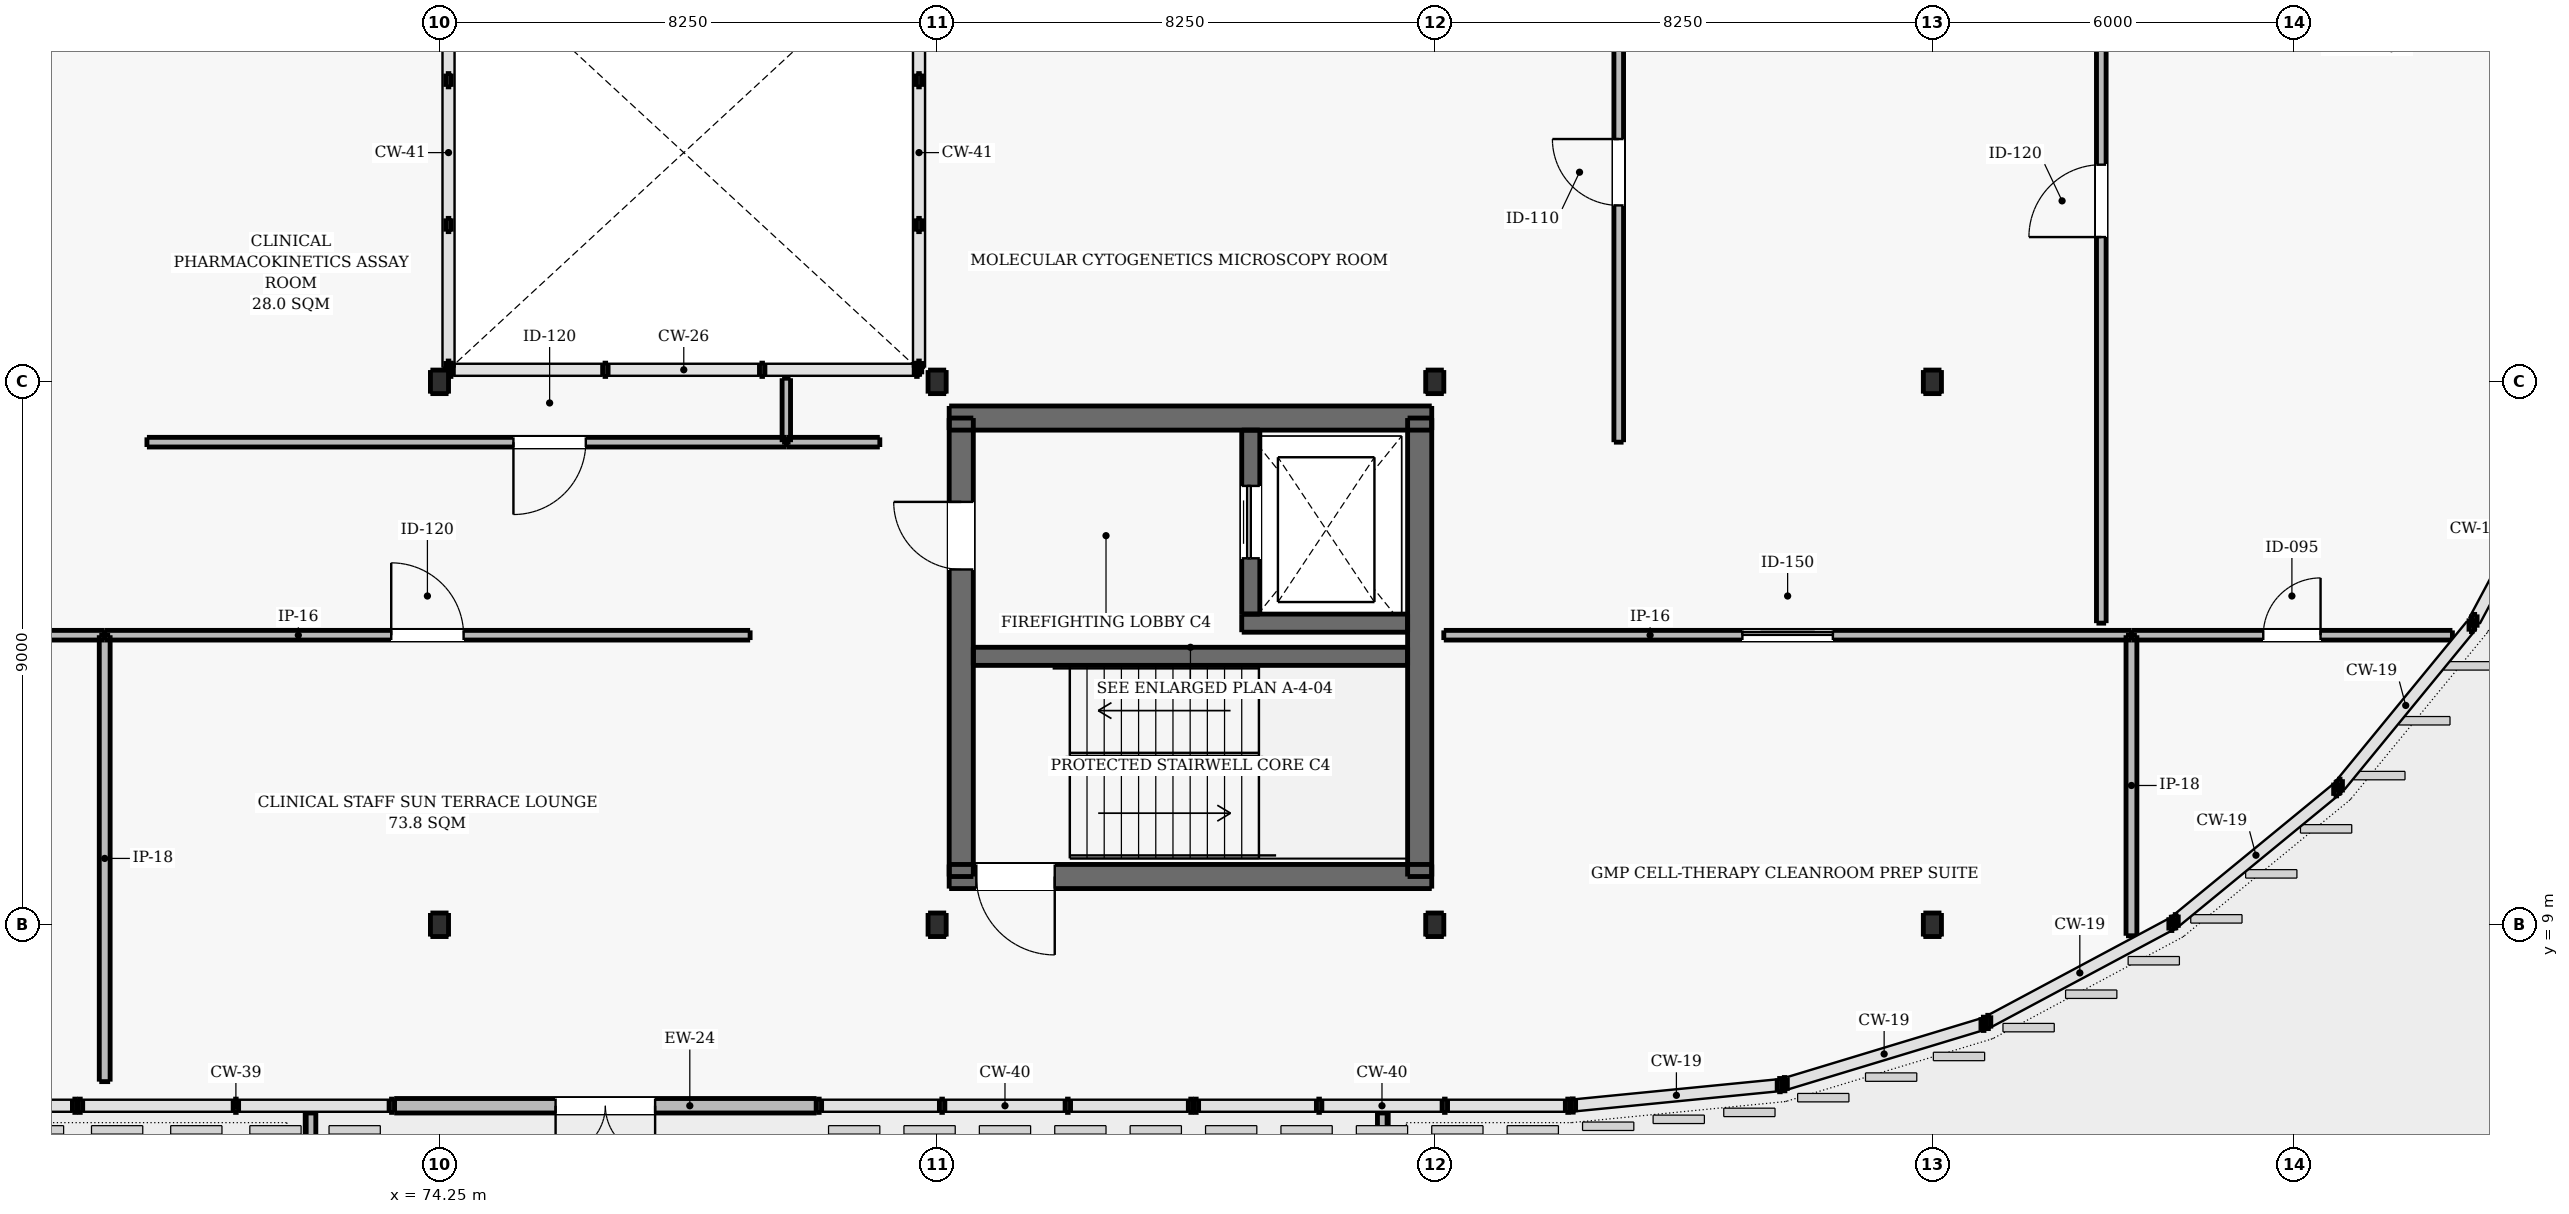
"""IFC4 building model, lengths in metres.
Left out: names, types, materials, properties, quantities, classifications, styles, units other than length and angle.
Written with IfcOpenShell. Run it as: python <this file> out.ifc"""

import sys

from ifc_helpers import new_model, si_unit, direction, frame, frame_2d, origin, origin_2d, place, context, subcontext, project, spatial, rectangle, i_section, extrude, element, fill, save


model = new_model("IFC4")
c1 = context("Model", 3, precision=1e-05, world=origin(), true_north=direction((0.0, 1.0)))
c2 = subcontext(c1, "Body", "Model", "MODEL_VIEW")
j1 = project(units=[si_unit("LENGTHUNIT", "METRE"), si_unit("PLANEANGLEUNIT", "RADIAN")], contexts=[c1])
p1 = place(None, origin())
s1 = spatial("IfcSite", under=j1, at=p1, CompositionType="ELEMENT")
p2 = place(p1, origin())
s2 = spatial("IfcBuilding", under=s1, at=p2, CompositionType="ELEMENT")
p3 = place(p2, frame((0.0, 0.0, 22.2)))
s3 = spatial("IfcBuildingStorey", under=s2, at=p3, CompositionType="ELEMENT", Elevation=22.2)
for number, where, z_axis, x_axis in (
    (1, (74.25, 9.0, 0.0), (0.0, 0.0, 1.0), (1.0, 0.0, 0.0)),
    (2, (74.25, 18.0, 0.0), (0.0, 0.0, 1.0), (1.0, 0.0, 0.0)),
    (3, (82.5, 9.0, 0.0), (0.0, 0.0, 1.0), (1.0, 0.0, 0.0)),
    (4, (82.5, 18.0, 0.0), (0.0, 0.0, 1.0), (1.0, 0.0, 0.0)),
    (5, (90.75, 9.0, 0.0), (0.0, 0.0, 1.0), (1.0, 0.0, 0.0)),
    (6, (90.75, 18.0, 0.0), (0.0, 0.0, 1.0), (1.0, 0.0, 0.0)),
    (7, (99.0, 9.0, 0.0), (0.0, 0.0, 1.0), (1.0, 0.0, 0.0)),
    (8, (99.0, 18.0, 0.0), (0.0, 0.0, 1.0), (1.0, 0.0, 0.0)),
):
    element("IfcColumn", number, at=place(p3, frame(where, z_axis=z_axis, x_axis=x_axis)), inside=s3, PredefinedType="COLUMN", context=c2, shape_type="SweptSolid", body=[
        extrude(i_section(OverallWidth=0.3, OverallDepth=0.39, WebThickness=0.011, FlangeThickness=0.019, FilletRadius=0.027, at=origin_2d()), origin(), (0.0, 0.0, 1.0), 4.2),
    ])
p4 = place(p3, frame((82.7, 9.8, 0.0), z_axis=(0.0, 0.0, 1.0), x_axis=(1.0, 0.0, 0.0)))
e9 = element("IfcWall", 9, at=p4, inside=s3, PredefinedType="SHEAR", context=c2, shape_type="SweptSolid", body=[
    extrude(rectangle(XDim=8.0, YDim=0.4, at=frame_2d((4.0, 0.0))), origin(), (0.0, 0.0, 1.0), 4.2),
])
p5 = place(p4, frame((0.45, 0.0, 0.0)))
e10 = element("IfcOpeningElement", 10, at=p5, cuts=e9, PredefinedType="OPENING", context=c2, shape_type="SweptSolid", body=[
    extrude(rectangle(XDim=1.3, YDim=2.15, at=frame_2d((0.65, 1.075))), frame((0.0, 0.21, 0.0), z_axis=(0.0, -1.0, 0.0), x_axis=(1.0, 0.0, 0.0)), (0.0, 0.0, 1.0), 0.42),
])
p6 = place(p3, frame((82.7, 17.4, 0.0), z_axis=(0.0, 0.0, 1.0), x_axis=(1.0, 0.0, 0.0)))
e11 = element("IfcWall", 11, at=p6, inside=s3, PredefinedType="SHEAR", context=c2, shape_type="SweptSolid", body=[
    extrude(rectangle(XDim=8.0, YDim=0.4, at=frame_2d((4.0, 0.0))), origin(), (0.0, 0.0, 1.0), 4.2),
])
p7 = place(p3, frame((82.9, 9.8, 0.0), z_axis=(0.0, 0.0, 1.0), x_axis=(0.0, 1.0, 0.0)))
e12 = element("IfcWall", 12, at=p7, inside=s3, PredefinedType="SHEAR", context=c2, shape_type="SweptSolid", body=[
    extrude(rectangle(XDim=7.6, YDim=0.4, at=frame_2d((3.8, 0.0))), origin(), (0.0, 0.0, 1.0), 4.2),
])
p8 = place(p7, frame((5.09, 0.0, 0.0)))
e13 = element("IfcOpeningElement", 13, at=p8, cuts=e12, PredefinedType="OPENING", context=c2, shape_type="SweptSolid", body=[
    extrude(rectangle(XDim=1.12, YDim=2.15, at=frame_2d((0.56, 1.075))), frame((0.0, 0.21, 0.0), z_axis=(0.0, -1.0, 0.0), x_axis=(1.0, 0.0, 0.0)), (0.0, 0.0, 1.0), 0.42),
])
p9 = place(p3, frame((90.5, 9.8, 0.0), z_axis=(0.0, 0.0, 1.0), x_axis=(0.0, 1.0, 0.0)))
e14 = element("IfcWall", 14, at=p9, inside=s3, PredefinedType="SHEAR", context=c2, shape_type="SweptSolid", body=[
    extrude(rectangle(XDim=7.6, YDim=0.4, at=frame_2d((3.8, 0.0))), origin(), (0.0, 0.0, 1.0), 4.2),
])
p10 = place(p3, frame((83.1, 13.45, 0.0), z_axis=(0.0, 0.0, 1.0), x_axis=(1.0, 0.0, 0.0)))
e15 = element("IfcWall", 15, at=p10, inside=s3, PredefinedType="SHEAR", context=c2, shape_type="SweptSolid", body=[
    extrude(rectangle(XDim=7.2, YDim=0.3, at=frame_2d((3.6, 0.0))), origin(), (0.0, 0.0, 1.0), 4.2),
])
p11 = place(p3, frame((87.55, 14.0, 0.0), z_axis=(0.0, 0.0, 1.0), x_axis=(1.0, 0.0, 0.0)))
e16 = element("IfcWall", 16, at=p11, inside=s3, PredefinedType="SHEAR", context=c2, shape_type="SweptSolid", body=[
    extrude(rectangle(XDim=2.75, YDim=0.3, at=frame_2d((1.375, 0.0))), origin(), (0.0, 0.0, 1.0), 4.2),
])
p12 = place(p3, frame((87.7, 14.15, 0.0), z_axis=(0.0, 0.0, 1.0), x_axis=(0.0, 1.0, 0.0)))
e17 = element("IfcWall", 17, at=p12, inside=s3, PredefinedType="SHEAR", context=c2, shape_type="SweptSolid", body=[
    extrude(rectangle(XDim=3.05, YDim=0.3, at=frame_2d((1.525, 0.0))), origin(), (0.0, 0.0, 1.0), 4.2),
])
p13 = place(p12, frame((0.925, 0.0, 0.0)))
e18 = element("IfcOpeningElement", 18, at=p13, cuts=e17, PredefinedType="OPENING", context=c2, shape_type="SweptSolid", body=[
    extrude(rectangle(XDim=1.2, YDim=2.15, at=frame_2d((0.6, 1.075))), frame((0.0, 0.16, 0.0), z_axis=(0.0, -1.0, 0.0), x_axis=(1.0, 0.0, 0.0)), (0.0, 0.0, 1.0), 0.32),
])
p14 = place(p3, frame((80.5, 6.0, 0.0), z_axis=(0.0, 0.0, 1.0), x_axis=(-1.0, 0.0, 0.0)))
e19 = element("IfcWall", 19, at=p14, inside=s3, PredefinedType="SOLIDWALL", context=c2, shape_type="SweptSolid", body=[
    extrude(rectangle(XDim=7.0, YDim=0.24, at=frame_2d((3.5, 0.0))), origin(), (0.0, 0.0, 1.0), 3.94),
])
p15 = place(p14, frame((2.675, 0.0, 0.0)))
e20 = element("IfcOpeningElement", 20, at=p15, cuts=e19, PredefinedType="OPENING", context=c2, shape_type="SweptSolid", body=[
    extrude(rectangle(XDim=1.65, YDim=2.2, at=frame_2d((0.825, 1.1))), frame((0.0, 0.13, 0.0), z_axis=(0.0, -1.0, 0.0), x_axis=(1.0, 0.0, 0.0)), (0.0, 0.0, 1.0), 0.26),
])
for number, where, z_axis, x_axis in (
    (21, (72.12, 0.12, 0.0), (0.0, 0.0, 1.0), (0.0, 1.0, 0.0)),
    (22, (89.88, 0.12, 0.0), (0.0, 0.0, 1.0), (0.0, 1.0, 0.0)),
):
    element("IfcWall", number, at=place(p3, frame(where, z_axis=z_axis, x_axis=x_axis)), inside=s3, PredefinedType="PARAPET", context=c2, shape_type="SweptSolid", body=[
        extrude(rectangle(XDim=5.76, YDim=0.16, at=frame_2d((2.88, 0.0))), origin(), (0.0, 0.0, 1.0), 1.14),
    ])
p16 = place(p3, frame((58.0, 13.8, 0.0), z_axis=(0.0, 0.0, 1.0), x_axis=(1.0, 0.0, 0.0)))
e23 = element("IfcWall", 23, at=p16, inside=s3, PredefinedType="PARTITIONING", context=c2, shape_type="SweptSolid", body=[
    extrude(rectangle(XDim=10.7, YDim=0.16, at=frame_2d((5.35, 0.0))), origin(), (0.0, 0.0, 1.0), 3.94),
])
p17 = place(p16, frame((4.75, 0.0, 0.0)))
e24 = element("IfcOpeningElement", 24, at=p17, cuts=e23, PredefinedType="OPENING", context=c2, shape_type="SweptSolid", body=[
    extrude(rectangle(XDim=1.2, YDim=2.2, at=frame_2d((0.6, 1.1))), frame((0.0, 0.09, 0.0), z_axis=(0.0, -1.0, 0.0), x_axis=(1.0, 0.0, 0.0)), (0.0, 0.0, 1.0), 0.18),
])
p18 = place(p3, frame((68.7, 6.4, 0.0), z_axis=(0.0, 0.0, 1.0), x_axis=(0.0, 1.0, 0.0)))
e25 = element("IfcWall", 25, at=p18, inside=s3, PredefinedType="PARTITIONING", context=c2, shape_type="SweptSolid", body=[
    extrude(rectangle(XDim=7.4, YDim=0.18, at=frame_2d((3.7, 0.0))), origin(), (0.0, 0.0, 1.0), 3.62),
])
p19 = place(p3, frame((68.7, 13.8, 0.0), z_axis=(0.0, 0.0, 1.0), x_axis=(1.0, 0.0, 0.0)))
e26 = element("IfcWall", 26, at=p19, inside=s3, PredefinedType="PARTITIONING", context=c2, shape_type="SweptSolid", body=[
    extrude(rectangle(XDim=10.7, YDim=0.16, at=frame_2d((5.35, 0.0))), origin(), (0.0, 0.0, 1.0), 3.94),
])
p20 = place(p19, frame((4.75, 0.0, 0.0)))
e27 = element("IfcOpeningElement", 27, at=p20, cuts=e26, PredefinedType="OPENING", context=c2, shape_type="SweptSolid", body=[
    extrude(rectangle(XDim=1.2, YDim=2.2, at=frame_2d((0.6, 1.1))), frame((0.0, 0.09, 0.0), z_axis=(0.0, -1.0, 0.0), x_axis=(1.0, 0.0, 0.0)), (0.0, 0.0, 1.0), 0.18),
])
p21 = place(p3, frame((90.9, 13.8, 0.0), z_axis=(0.0, 0.0, 1.0), x_axis=(1.0, 0.0, 0.0)))
e28 = element("IfcWall", 28, at=p21, inside=s3, PredefinedType="PARTITIONING", context=c2, shape_type="SweptSolid", body=[
    extrude(rectangle(XDim=11.4, YDim=0.16, at=frame_2d((5.7, 0.0))), origin(), (0.0, 0.0, 1.0), 3.94),
])
p22 = place(p21, frame((4.95, 0.0, 0.0)))
e29 = element("IfcOpeningElement", 29, at=p22, cuts=e28, PredefinedType="OPENING", context=c2, shape_type="SweptSolid", body=[
    extrude(rectangle(XDim=1.5, YDim=2.25, at=frame_2d((0.75, 1.125))), frame((0.0, 0.09, 0.0), z_axis=(0.0, -1.0, 0.0), x_axis=(1.0, 0.0, 0.0)), (0.0, 0.0, 1.0), 0.18),
])
p23 = place(p3, frame((102.3, 8.818, 0.0), z_axis=(0.0, 0.0, 1.0), x_axis=(0.0, 1.0, 0.0)))
e30 = element("IfcWall", 30, at=p23, inside=s3, PredefinedType="PARTITIONING", context=c2, shape_type="SweptSolid", body=[
    extrude(rectangle(XDim=4.982, YDim=0.18, at=frame_2d((2.491, 0.0))), origin(), (0.0, 0.0, 1.0), 3.94),
])
p24 = place(p3, frame((102.3, 13.8, 0.0), z_axis=(0.0, 0.0, 1.0), x_axis=(1.0, 0.0, 0.0)))
e31 = element("IfcWall", 31, at=p24, inside=s3, PredefinedType="PARTITIONING", context=c2, shape_type="SweptSolid", body=[
    extrude(rectangle(XDim=5.321, YDim=0.16, at=frame_2d((2.661, 0.0))), origin(), (0.0, 0.0, 1.0), 3.94),
])
p25 = place(p24, frame((2.185, 0.0, 0.0)))
e32 = element("IfcOpeningElement", 32, at=p25, cuts=e31, PredefinedType="OPENING", context=c2, shape_type="SweptSolid", body=[
    extrude(rectangle(XDim=0.95, YDim=2.1, at=frame_2d((0.475, 1.05))), frame((0.0, 0.09, 0.0), z_axis=(0.0, -1.0, 0.0), x_axis=(1.0, 0.0, 0.0)), (0.0, 0.0, 1.0), 0.18),
])
p26 = place(p3, frame((101.8, 14.0, 0.0), z_axis=(0.0, 0.0, 1.0), x_axis=(0.0, 1.0, 0.0)))
e33 = element("IfcWall", 33, at=p26, inside=s3, PredefinedType="PARTITIONING", context=c2, shape_type="SweptSolid", body=[
    extrude(rectangle(XDim=14.0, YDim=0.16, at=frame_2d((7.0, 0.0))), origin(), (0.0, 0.0, 1.0), 3.94),
])
p27 = place(p26, frame((6.4, 0.0, 0.0)))
e34 = element("IfcOpeningElement", 34, at=p27, cuts=e33, PredefinedType="OPENING", context=c2, shape_type="SweptSolid", body=[
    extrude(rectangle(XDim=1.2, YDim=2.2, at=frame_2d((0.6, 1.1))), frame((0.0, 0.09, 0.0), z_axis=(0.0, -1.0, 0.0), x_axis=(1.0, 0.0, 0.0)), (0.0, 0.0, 1.0), 0.18),
])
p28 = place(p3, frame((69.4, 17.0, 0.0), z_axis=(0.0, 0.0, 1.0), x_axis=(1.0, 0.0, 0.0)))
e35 = element("IfcWall", 35, at=p28, inside=s3, PredefinedType="PARTITIONING", context=c2, shape_type="SweptSolid", body=[
    extrude(rectangle(XDim=10.6, YDim=0.16, at=frame_2d((5.3, 0.0))), origin(), (0.0, 0.0, 1.0), 3.94),
])
p29 = place(p28, frame((6.076, 0.0, 0.0)))
e36 = element("IfcOpeningElement", 36, at=p29, cuts=e35, PredefinedType="OPENING", context=c2, shape_type="SweptSolid", body=[
    extrude(rectangle(XDim=1.2, YDim=2.2, at=frame_2d((0.6, 1.1))), frame((0.0, 0.09, 0.0), z_axis=(0.0, -1.0, 0.0), x_axis=(1.0, 0.0, 0.0)), (0.0, 0.0, 1.0), 0.18),
])
p30 = place(p3, frame((80.0, 17.0, 0.0), z_axis=(0.0, 0.0, 1.0), x_axis=(0.0, 1.0, 0.0)))
e37 = element("IfcWall", 37, at=p30, inside=s3, PredefinedType="PARTITIONING", context=c2, shape_type="SweptSolid", body=[
    extrude(rectangle(XDim=1.06, YDim=0.14, at=frame_2d((0.53, 0.0))), origin(), (0.0, 0.0, 1.0), 3.94),
])
p31 = place(p3, frame((80.0, 17.0, 0.0), z_axis=(0.0, 0.0, 1.0), x_axis=(1.0, 0.0, 0.0)))
e38 = element("IfcWall", 38, at=p31, inside=s3, PredefinedType="PARTITIONING", context=c2, shape_type="SweptSolid", body=[
    extrude(rectangle(XDim=1.55, YDim=0.16, at=frame_2d((0.775, 0.0))), origin(), (0.0, 0.0, 1.0), 3.94),
])
p32 = place(p3, frame((93.8, 17.0, 0.0), z_axis=(0.0, 0.0, 1.0), x_axis=(0.0, 1.0, 0.0)))
e39 = element("IfcWall", 39, at=p32, inside=s3, PredefinedType="PARTITIONING", context=c2, shape_type="SweptSolid", body=[
    extrude(rectangle(XDim=8.95, YDim=0.16, at=frame_2d((4.475, 0.0))), origin(), (0.0, 0.0, 1.0), 3.94),
])
p33 = place(p32, frame((3.925, 0.0, 0.0)))
e40 = element("IfcOpeningElement", 40, at=p33, cuts=e39, PredefinedType="OPENING", context=c2, shape_type="SweptSolid", body=[
    extrude(rectangle(XDim=1.1, YDim=2.15, at=frame_2d((0.55, 1.075))), frame((0.0, 0.09, 0.0), z_axis=(0.0, -1.0, 0.0), x_axis=(1.0, 0.0, 0.0)), (0.0, 0.0, 1.0), 0.18),
])
p34 = place(p15, origin())
e41 = element("IfcDoor", 41, at=p34, inside=s3, OperationType="DOUBLE_DOOR_SINGLE_SWING", PredefinedType="DOOR", context=c2, shape_type="SweptSolid", body=[
    extrude(rectangle(XDim=1.65, YDim=2.2, at=frame_2d((0.825, 1.1))), frame((0.0, 0.025, 0.0), z_axis=(0.0, -1.0, 0.0), x_axis=(1.0, 0.0, 0.0)), (0.0, 0.0, 1.0), 0.05),
])
fill(e20, e41)
p35 = place(p13, origin())
e42 = element("IfcDoor", 42, at=p35, inside=s3, OperationType="DOUBLE_DOOR_SLIDING", PredefinedType="DOOR", context=c2, shape_type="SweptSolid", body=[
    extrude(rectangle(XDim=1.2, YDim=2.15, at=frame_2d((0.6, 1.075))), frame((0.0, 0.025, 0.0), z_axis=(0.0, -1.0, 0.0), x_axis=(1.0, 0.0, 0.0)), (0.0, 0.0, 1.0), 0.05),
])
fill(e18, e42)
p36 = place(p8, origin())
e43 = element("IfcDoor", 43, at=p36, inside=s3, OperationType="SINGLE_SWING_RIGHT", PredefinedType="DOOR", context=c2, shape_type="SweptSolid", body=[
    extrude(rectangle(XDim=1.12, YDim=2.15, at=frame_2d((0.56, 1.075))), frame((0.0, 0.025, 0.0), z_axis=(0.0, -1.0, 0.0), x_axis=(1.0, 0.0, 0.0)), (0.0, 0.0, 1.0), 0.05),
])
fill(e13, e43)
p37 = place(p5, frame((1.3, 0.0, 0.0), z_axis=(0.0, 0.0, 1.0), x_axis=(-1.0, 0.0, 0.0)))
e44 = element("IfcDoor", 44, at=p37, inside=s3, OperationType="SINGLE_SWING_RIGHT", PredefinedType="DOOR", context=c2, shape_type="SweptSolid", body=[
    extrude(rectangle(XDim=1.3, YDim=2.15, at=frame_2d((0.65, 1.075))), frame((0.0, 0.025, 0.0), z_axis=(0.0, -1.0, 0.0), x_axis=(1.0, 0.0, 0.0)), (0.0, 0.0, 1.0), 0.05),
])
fill(e10, e44)
p38 = place(p20, origin())
e45 = element("IfcDoor", 45, at=p38, inside=s3, OperationType="SINGLE_SWING_LEFT", PredefinedType="DOOR", context=c2, shape_type="SweptSolid", body=[
    extrude(rectangle(XDim=1.2, YDim=2.2, at=frame_2d((0.6, 1.1))), frame((0.0, 0.025, 0.0), z_axis=(0.0, -1.0, 0.0), x_axis=(1.0, 0.0, 0.0)), (0.0, 0.0, 1.0), 0.05),
])
fill(e27, e45)
p39 = place(p22, origin())
e46 = element("IfcDoor", 46, at=p39, inside=s3, OperationType="SLIDING_TO_LEFT", PredefinedType="DOOR", context=c2, shape_type="SweptSolid", body=[
    extrude(rectangle(XDim=1.5, YDim=2.25, at=frame_2d((0.75, 1.125))), frame((0.0, 0.025, 0.0), z_axis=(0.0, -1.0, 0.0), x_axis=(1.0, 0.0, 0.0)), (0.0, 0.0, 1.0), 0.05),
])
fill(e29, e46)
p40 = place(p25, origin())
e47 = element("IfcDoor", 47, at=p40, inside=s3, OperationType="SINGLE_SWING_RIGHT", PredefinedType="DOOR", context=c2, shape_type="SweptSolid", body=[
    extrude(rectangle(XDim=0.95, YDim=2.1, at=frame_2d((0.475, 1.05))), frame((0.0, 0.025, 0.0), z_axis=(0.0, -1.0, 0.0), x_axis=(1.0, 0.0, 0.0)), (0.0, 0.0, 1.0), 0.05),
])
fill(e32, e47)
p41 = place(p27, origin())
e48 = element("IfcDoor", 48, at=p41, inside=s3, OperationType="SINGLE_SWING_LEFT", PredefinedType="DOOR", context=c2, shape_type="SweptSolid", body=[
    extrude(rectangle(XDim=1.2, YDim=2.2, at=frame_2d((0.6, 1.1))), frame((0.0, 0.025, 0.0), z_axis=(0.0, -1.0, 0.0), x_axis=(1.0, 0.0, 0.0)), (0.0, 0.0, 1.0), 0.05),
])
fill(e34, e48)
p42 = place(p29, frame((1.2, 0.0, 0.0), z_axis=(0.0, 0.0, 1.0), x_axis=(-1.0, 0.0, 0.0)))
e49 = element("IfcDoor", 49, at=p42, inside=s3, OperationType="SINGLE_SWING_LEFT", PredefinedType="DOOR", context=c2, shape_type="SweptSolid", body=[
    extrude(rectangle(XDim=1.2, YDim=2.2, at=frame_2d((0.6, 1.1))), frame((0.0, 0.025, 0.0), z_axis=(0.0, -1.0, 0.0), x_axis=(1.0, 0.0, 0.0)), (0.0, 0.0, 1.0), 0.05),
])
fill(e36, e49)
p43 = place(p33, origin())
e50 = element("IfcDoor", 50, at=p43, inside=s3, OperationType="SINGLE_SWING_RIGHT", PredefinedType="DOOR", context=c2, shape_type="SweptSolid", body=[
    extrude(rectangle(XDim=1.1, YDim=2.15, at=frame_2d((0.55, 1.075))), frame((0.0, 0.025, 0.0), z_axis=(0.0, -1.0, 0.0), x_axis=(1.0, 0.0, 0.0)), (0.0, 0.0, 1.0), 0.05),
])
fill(e40, e50)
save(model, sys.argv[1])
